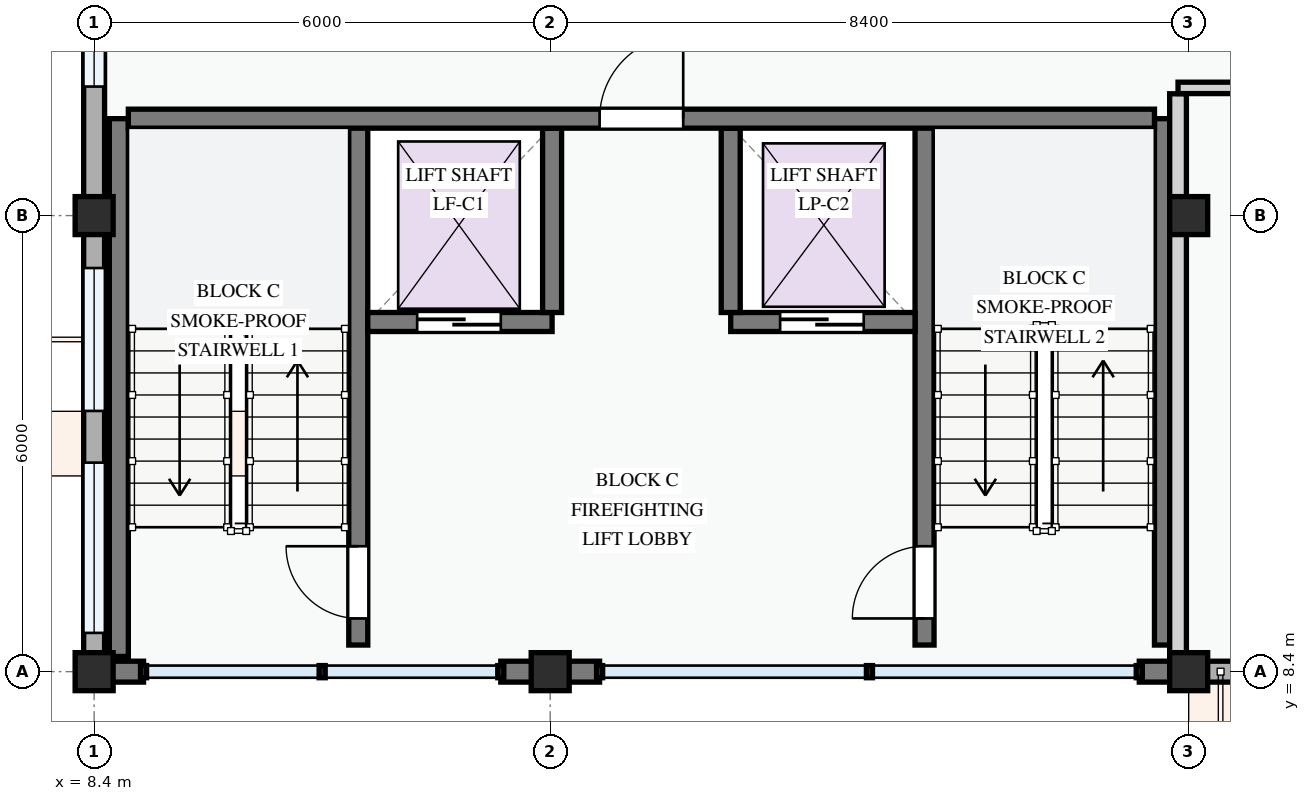
"""IFC4 building model, lengths in metres.
Left out: names, types, materials, properties, quantities, classifications, styles, units other than length and angle.
Written with IfcOpenShell. Run it as: python <this file> out.ifc"""

import sys

from ifc_helpers import new_model, si_unit, direction, frame, frame_2d, origin, origin_2d, place, context, subcontext, project, spatial, rectangle, extrude, element, fill, save


model = new_model("IFC4")
c1 = context("Model", 3, precision=1e-05, world=origin(), true_north=direction((0.0, 1.0)))
c2 = subcontext(c1, "Body", "Model", "MODEL_VIEW")
j1 = project(units=[si_unit("LENGTHUNIT", "METRE"), si_unit("PLANEANGLEUNIT", "RADIAN")], contexts=[c1])
p1 = place(None, origin())
s1 = spatial("IfcSite", under=j1, at=p1, CompositionType="ELEMENT")
p2 = place(p1, origin())
s2 = spatial("IfcBuilding", under=s1, at=p2, CompositionType="ELEMENT")
p3 = place(p2, frame((0.0, 0.0, 24.6)))
s3 = spatial("IfcBuildingStorey", under=s2, at=p3, CompositionType="ELEMENT", Elevation=24.6)
for number, where, z_axis, x_axis in (
    (1, (8.4, 8.4, 0.0), (0.0, 0.0, 1.0), (1.0, 0.0, 0.0)),
    (2, (8.4, 14.4, 0.0), (0.0, 0.0, 1.0), (1.0, 0.0, 0.0)),
    (3, (14.4, 8.4, 0.0), (0.0, 0.0, 1.0), (1.0, 0.0, 0.0)),
    (4, (22.8, 8.4, 0.0), (0.0, 0.0, 1.0), (1.0, 0.0, 0.0)),
    (5, (22.8, 14.4, 0.0), (0.0, 0.0, 1.0), (1.0, 0.0, 0.0)),
):
    element("IfcColumn", number, at=place(p3, frame(where, z_axis=z_axis, x_axis=x_axis)), inside=s3, PredefinedType="COLUMN", context=c2, shape_type="SweptSolid", body=[
        extrude(rectangle(XDim=0.5, YDim=0.5, at=origin_2d()), origin(), (0.0, 0.0, 1.0), 3.3),
    ])
p4 = place(p3, frame((8.4, 22.8, 0.0), z_axis=(0.0, 0.0, 1.0), x_axis=(0.0, -1.0, 0.0)))
e6 = element("IfcWall", 6, at=p4, inside=s3, PredefinedType="STANDARD", context=c2, shape_type="SweptSolid", body=[
    extrude(rectangle(XDim=8.4, YDim=0.275, at=frame_2d((4.2, 0.0))), origin(), (0.0, 0.0, 1.0), 2.425),
])
p5 = place(p4, frame((1.035, 0.0, 0.78)))
e7 = element("IfcOpeningElement", 7, at=p5, cuts=e6, PredefinedType="OPENING", context=c2, shape_type="SweptSolid", body=[
    extrude(rectangle(XDim=2.32, YDim=1.5, at=frame_2d((1.16, 0.75))), frame((0.0, 0.147, 0.0), z_axis=(0.0, -1.0, 0.0), x_axis=(1.0, 0.0, 0.0)), (0.0, 0.0, 1.0), 0.295),
])
p6 = place(p4, frame((4.623, 0.0, 0.78)))
e8 = element("IfcOpeningElement", 8, at=p6, cuts=e6, PredefinedType="OPENING", context=c2, shape_type="SweptSolid", body=[
    extrude(rectangle(XDim=2.08, YDim=1.52, at=frame_2d((1.04, 0.76))), frame((0.0, 0.147, 0.0), z_axis=(0.0, -1.0, 0.0), x_axis=(1.0, 0.0, 0.0)), (0.0, 0.0, 1.0), 0.295),
])
p7 = place(p3, frame((8.4, 14.4, 0.0), z_axis=(0.0, 0.0, 1.0), x_axis=(0.0, -1.0, 0.0)))
e9 = element("IfcWall", 9, at=p7, inside=s3, PredefinedType="STANDARD", context=c2, shape_type="SweptSolid", body=[
    extrude(rectangle(XDim=6.0, YDim=0.275, at=frame_2d((3.0, 0.0))), origin(), (0.0, 0.0, 1.0), 2.575),
])
p8 = place(p7, frame((0.69, 0.0, 0.78)))
e10 = element("IfcOpeningElement", 10, at=p8, cuts=e9, PredefinedType="OPENING", context=c2, shape_type="SweptSolid", body=[
    extrude(rectangle(XDim=1.88, YDim=1.52, at=frame_2d((0.94, 0.76))), frame((0.0, 0.147, 0.0), z_axis=(0.0, -1.0, 0.0), x_axis=(1.0, 0.0, 0.0)), (0.0, 0.0, 1.0), 0.295),
])
p9 = place(p7, frame((3.25, 0.0, 0.78)))
e11 = element("IfcOpeningElement", 11, at=p9, cuts=e9, PredefinedType="OPENING", context=c2, shape_type="SweptSolid", body=[
    extrude(rectangle(XDim=2.24, YDim=1.52, at=frame_2d((1.12, 0.76))), frame((0.0, 0.147, 0.0), z_axis=(0.0, -1.0, 0.0), x_axis=(1.0, 0.0, 0.0)), (0.0, 0.0, 1.0), 0.295),
])
p10 = place(p3, frame((8.54, 8.4, 0.0), z_axis=(0.0, 0.0, 1.0), x_axis=(1.0, 0.0, 0.0)))
e12 = element("IfcWall", 12, at=p10, inside=s3, PredefinedType="STANDARD", context=c2, shape_type="SweptSolid", body=[
    extrude(rectangle(XDim=0.51, YDim=0.275, at=frame_2d((0.255, 0.0))), origin(), (0.0, 0.0, 1.0), 3.04),
])
p11 = place(p3, frame((13.75, 8.4, 0.0), z_axis=(0.0, 0.0, 1.0), x_axis=(1.0, 0.0, 0.0)))
e13 = element("IfcWall", 13, at=p11, inside=s3, PredefinedType="STANDARD", context=c2, shape_type="SweptSolid", body=[
    extrude(rectangle(XDim=0.65, YDim=0.275, at=frame_2d((0.325, 0.0))), origin(), (0.0, 0.0, 1.0), 3.04),
])
for number, where, z_axis, x_axis in (
    (14, (14.4, 8.4, 0.0), (0.0, 0.0, 1.0), (1.0, 0.0, 0.0)),
    (15, (22.15, 8.4, 0.0), (0.0, 0.0, 1.0), (1.0, 0.0, 0.0)),
):
    element("IfcWall", number, at=place(p3, frame(where, z_axis=z_axis, x_axis=x_axis)), inside=s3, PredefinedType="STANDARD", context=c2, shape_type="SweptSolid", body=[
        extrude(rectangle(XDim=0.65, YDim=0.275, at=frame_2d((0.325, 0.0))), origin(), (0.0, 0.0, 1.0), 3.04),
    ])
p12 = place(p3, frame((22.8, 8.4, 0.0), z_axis=(0.0, 0.0, 1.0), x_axis=(1.0, 0.0, 0.0)))
e16 = element("IfcWall", 16, at=p12, inside=s3, PredefinedType="STANDARD", context=c2, shape_type="SweptSolid", body=[
    extrude(rectangle(XDim=6.0, YDim=0.275, at=frame_2d((3.0, 0.0))), origin(), (0.0, 0.0, 1.0), 2.475),
])
p13 = place(p12, frame((0.62, 0.0, 0.0)))
e17 = element("IfcOpeningElement", 17, at=p13, cuts=e16, PredefinedType="OPENING", context=c2, shape_type="SweptSolid", body=[
    extrude(rectangle(XDim=1.1, YDim=2.15, at=frame_2d((0.55, 1.075))), frame((0.0, 0.147, 0.0), z_axis=(0.0, -1.0, 0.0), x_axis=(1.0, 0.0, 0.0)), (0.0, 0.0, 1.0), 0.295),
])
p14 = place(p12, frame((2.482, 0.0, 0.78)))
e18 = element("IfcOpeningElement", 18, at=p14, cuts=e16, PredefinedType="OPENING", context=c2, shape_type="SweptSolid", body=[
    extrude(rectangle(XDim=1.05, YDim=1.2, at=frame_2d((0.525, 0.6))), frame((0.0, 0.147, 0.0), z_axis=(0.0, -1.0, 0.0), x_axis=(1.0, 0.0, 0.0)), (0.0, 0.0, 1.0), 0.295),
])
p15 = place(p12, frame((4.552, 0.0, 0.78)))
e19 = element("IfcOpeningElement", 19, at=p15, cuts=e16, PredefinedType="OPENING", context=c2, shape_type="SweptSolid", body=[
    extrude(rectangle(XDim=0.95, YDim=1.15, at=frame_2d((0.475, 0.575))), frame((0.0, 0.147, 0.0), z_axis=(0.0, -1.0, 0.0), x_axis=(1.0, 0.0, 0.0)), (0.0, 0.0, 1.0), 0.295),
])
p16 = place(p3, frame((11.875, 8.75, 0.0), z_axis=(0.0, 0.0, 1.0), x_axis=(0.0, 1.0, 0.0)))
e20 = element("IfcWall", 20, at=p16, inside=s3, PredefinedType="SHEAR", context=c2, shape_type="SweptSolid", body=[
    extrude(rectangle(XDim=6.925, YDim=0.25, at=frame_2d((3.462, 0.0))), origin(), (0.0, 0.0, 1.0), 3.0),
])
p17 = place(p16, frame((0.35, 0.0, 0.0)))
e21 = element("IfcOpeningElement", 21, at=p17, cuts=e20, PredefinedType="OPENING", context=c2, shape_type="SweptSolid", body=[
    extrude(rectangle(XDim=0.95, YDim=2.1, at=frame_2d((0.475, 1.05))), frame((0.0, 0.135, 0.0), z_axis=(0.0, -1.0, 0.0), x_axis=(1.0, 0.0, 0.0)), (0.0, 0.0, 1.0), 0.27),
])
p18 = place(p3, frame((8.725, 8.6, 0.0), z_axis=(0.0, 0.0, 1.0), x_axis=(0.0, 1.0, 0.0)))
e22 = element("IfcWall", 22, at=p18, inside=s3, PredefinedType="SHEAR", context=c2, shape_type="SweptSolid", body=[
    extrude(rectangle(XDim=7.075, YDim=0.25, at=frame_2d((3.538, 0.0))), origin(), (0.0, 0.0, 1.0), 3.0),
])
p19 = place(p3, frame((22.475, 8.75, 0.0), z_axis=(0.0, 0.0, 1.0), x_axis=(0.0, 1.0, 0.0)))
e23 = element("IfcWall", 23, at=p19, inside=s3, PredefinedType="SHEAR", context=c2, shape_type="SweptSolid", body=[
    extrude(rectangle(XDim=6.925, YDim=0.25, at=frame_2d((3.462, 0.0))), origin(), (0.0, 0.0, 1.0), 3.0),
])
p20 = place(p3, frame((19.325, 8.75, 0.0), z_axis=(0.0, 0.0, 1.0), x_axis=(0.0, 1.0, 0.0)))
e24 = element("IfcWall", 24, at=p20, inside=s3, PredefinedType="SHEAR", context=c2, shape_type="SweptSolid", body=[
    extrude(rectangle(XDim=6.925, YDim=0.25, at=frame_2d((3.462, 0.0))), origin(), (0.0, 0.0, 1.0), 3.0),
])
p21 = place(p20, frame((0.35, 0.0, 0.0)))
e25 = element("IfcOpeningElement", 25, at=p21, cuts=e24, PredefinedType="OPENING", context=c2, shape_type="SweptSolid", body=[
    extrude(rectangle(XDim=0.95, YDim=2.1, at=frame_2d((0.475, 1.05))), frame((0.0, 0.135, 0.0), z_axis=(0.0, -1.0, 0.0), x_axis=(1.0, 0.0, 0.0)), (0.0, 0.0, 1.0), 0.27),
])
p22 = place(p3, frame((12.0, 13.0, 0.0), z_axis=(0.0, 0.0, 1.0), x_axis=(1.0, 0.0, 0.0)))
e26 = element("IfcWall", 26, at=p22, inside=s3, PredefinedType="SHEAR", context=c2, shape_type="SweptSolid", body=[
    extrude(rectangle(XDim=2.425, YDim=0.25, at=frame_2d((1.212, 0.0))), origin(), (0.0, 0.0, 1.0), 3.0),
])
p23 = place(p22, frame((0.65, 0.0, 0.0)))
e27 = element("IfcOpeningElement", 27, at=p23, cuts=e26, PredefinedType="OPENING", context=c2, shape_type="SweptSolid", body=[
    extrude(rectangle(XDim=1.1, YDim=2.15, at=frame_2d((0.55, 1.075))), frame((0.0, 0.135, 0.0), z_axis=(0.0, -1.0, 0.0), x_axis=(1.0, 0.0, 0.0)), (0.0, 0.0, 1.0), 0.27),
])
p24 = place(p3, frame((16.775, 13.0, 0.0), z_axis=(0.0, 0.0, 1.0), x_axis=(1.0, 0.0, 0.0)))
e28 = element("IfcWall", 28, at=p24, inside=s3, PredefinedType="SHEAR", context=c2, shape_type="SweptSolid", body=[
    extrude(rectangle(XDim=2.425, YDim=0.25, at=frame_2d((1.212, 0.0))), origin(), (0.0, 0.0, 1.0), 3.0),
])
p25 = place(p24, frame((0.65, 0.0, 0.0)))
e29 = element("IfcOpeningElement", 29, at=p25, cuts=e28, PredefinedType="OPENING", context=c2, shape_type="SweptSolid", body=[
    extrude(rectangle(XDim=1.1, YDim=2.15, at=frame_2d((0.55, 1.075))), frame((0.0, 0.135, 0.0), z_axis=(0.0, -1.0, 0.0), x_axis=(1.0, 0.0, 0.0)), (0.0, 0.0, 1.0), 0.27),
])
for number, where, z_axis, x_axis in (
    (30, (14.425, 13.125, 0.0), (0.0, 0.0, 1.0), (0.0, 1.0, 0.0)),
    (31, (16.775, 13.125, 0.0), (0.0, 0.0, 1.0), (0.0, 1.0, 0.0)),
):
    element("IfcWall", number, at=place(p3, frame(where, z_axis=z_axis, x_axis=x_axis)), inside=s3, PredefinedType="SHEAR", context=c2, shape_type="SweptSolid", body=[
        extrude(rectangle(XDim=2.425, YDim=0.25, at=frame_2d((1.212, 0.0))), origin(), (0.0, 0.0, 1.0), 3.0),
    ])
p26 = place(p3, frame((8.85, 15.675, 0.0), z_axis=(0.0, 0.0, 1.0), x_axis=(1.0, 0.0, 0.0)))
e32 = element("IfcWall", 32, at=p26, inside=s3, PredefinedType="SHEAR", context=c2, shape_type="SweptSolid", body=[
    extrude(rectangle(XDim=13.5, YDim=0.25, at=frame_2d((6.75, 0.0))), origin(), (0.0, 0.0, 1.0), 3.0),
])
p27 = place(p26, frame((6.2, 0.0, 0.0)))
e33 = element("IfcOpeningElement", 33, at=p27, cuts=e32, PredefinedType="OPENING", context=c2, shape_type="SweptSolid", body=[
    extrude(rectangle(XDim=1.1, YDim=2.15, at=frame_2d((0.55, 1.075))), frame((0.0, 0.135, 0.0), z_axis=(0.0, -1.0, 0.0), x_axis=(1.0, 0.0, 0.0)), (0.0, 0.0, 1.0), 0.27),
])
p28 = place(p3, frame((22.66, 8.54, 0.0), z_axis=(0.0, 0.0, 1.0), x_axis=(0.0, 1.0, 0.0)))
e34 = element("IfcWall", 34, at=p28, inside=s3, PredefinedType="PARTITIONING", context=c2, shape_type="SweptSolid", body=[
    extrude(rectangle(XDim=7.463, YDim=0.22, at=frame_2d((3.732, 0.0))), origin(), (0.0, 0.0, 1.0), 2.425),
])
p29 = place(p3, frame((22.66, 16.08, 0.0), z_axis=(0.0, 0.0, 1.0), x_axis=(1.0, 0.0, 0.0)))
e35 = element("IfcWall", 35, at=p29, inside=s3, PredefinedType="PARTITIONING", context=c2, shape_type="SweptSolid", body=[
    extrude(rectangle(XDim=34.88, YDim=0.15, at=frame_2d((17.44, 0.0))), origin(), (0.0, 0.0, 1.0), 3.0),
])
p30 = place(p29, frame((2.627, 0.0, 0.0)))
e36 = element("IfcOpeningElement", 36, at=p30, cuts=e35, PredefinedType="OPENING", context=c2, shape_type="SweptSolid", body=[
    extrude(rectangle(XDim=0.92, YDim=2.1, at=frame_2d((0.46, 1.05))), frame((0.0, 0.085, 0.0), z_axis=(0.0, -1.0, 0.0), x_axis=(1.0, 0.0, 0.0)), (0.0, 0.0, 1.0), 0.17),
])
p31 = place(p29, frame((10.02, 0.0, 0.0)))
e37 = element("IfcOpeningElement", 37, at=p31, cuts=e35, PredefinedType="OPENING", context=c2, shape_type="SweptSolid", body=[
    extrude(rectangle(XDim=0.96, YDim=2.12, at=frame_2d((0.48, 1.06))), frame((0.0, 0.085, 0.0), z_axis=(0.0, -1.0, 0.0), x_axis=(1.0, 0.0, 0.0)), (0.0, 0.0, 1.0), 0.17),
])
p32 = place(p29, frame((24.355, 0.0, 0.0)))
e38 = element("IfcOpeningElement", 38, at=p32, cuts=e35, PredefinedType="OPENING", context=c2, shape_type="SweptSolid", body=[
    extrude(rectangle(XDim=0.92, YDim=2.1, at=frame_2d((0.46, 1.05))), frame((0.0, 0.085, 0.0), z_axis=(0.0, -1.0, 0.0), x_axis=(1.0, 0.0, 0.0)), (0.0, 0.0, 1.0), 0.17),
])
p33 = place(p6, origin())
e39 = element("IfcWindow", 39, at=p33, inside=s3, PartitioningType="DOUBLE_PANEL_VERTICAL", PredefinedType="WINDOW", context=c2, shape_type="SweptSolid", body=[
    extrude(rectangle(XDim=2.08, YDim=1.52, at=frame_2d((1.04, 0.76))), frame((0.0, 0.03, 0.0), z_axis=(0.0, -1.0, 0.0), x_axis=(1.0, 0.0, 0.0)), (0.0, 0.0, 1.0), 0.06),
])
fill(e8, e39)
p34 = place(p8, origin())
e40 = element("IfcWindow", 40, at=p34, inside=s3, PartitioningType="DOUBLE_PANEL_VERTICAL", PredefinedType="WINDOW", context=c2, shape_type="SweptSolid", body=[
    extrude(rectangle(XDim=1.88, YDim=1.52, at=frame_2d((0.94, 0.76))), frame((0.0, 0.03, 0.0), z_axis=(0.0, -1.0, 0.0), x_axis=(1.0, 0.0, 0.0)), (0.0, 0.0, 1.0), 0.06),
])
fill(e10, e40)
p35 = place(p9, origin())
e41 = element("IfcWindow", 41, at=p35, inside=s3, PartitioningType="DOUBLE_PANEL_VERTICAL", PredefinedType="WINDOW", context=c2, shape_type="SweptSolid", body=[
    extrude(rectangle(XDim=2.24, YDim=1.52, at=frame_2d((1.12, 0.76))), frame((0.0, 0.03, 0.0), z_axis=(0.0, -1.0, 0.0), x_axis=(1.0, 0.0, 0.0)), (0.0, 0.0, 1.0), 0.06),
])
fill(e11, e41)
p36 = place(p17, origin())
e42 = element("IfcDoor", 42, at=p36, inside=s3, OperationType="SINGLE_SWING_RIGHT", PredefinedType="DOOR", context=c2, shape_type="SweptSolid", body=[
    extrude(rectangle(XDim=0.95, YDim=2.1, at=frame_2d((0.475, 1.05))), frame((0.0, 0.025, 0.0), z_axis=(0.0, -1.0, 0.0), x_axis=(1.0, 0.0, 0.0)), (0.0, 0.0, 1.0), 0.05),
])
fill(e21, e42)
p37 = place(p21, origin())
e43 = element("IfcDoor", 43, at=p37, inside=s3, OperationType="SINGLE_SWING_LEFT", PredefinedType="DOOR", context=c2, shape_type="SweptSolid", body=[
    extrude(rectangle(XDim=0.95, YDim=2.1, at=frame_2d((0.475, 1.05))), frame((0.0, 0.025, 0.0), z_axis=(0.0, -1.0, 0.0), x_axis=(1.0, 0.0, 0.0)), (0.0, 0.0, 1.0), 0.05),
])
fill(e25, e43)
p38 = place(p23, origin())
e44 = element("IfcDoor", 44, at=p38, inside=s3, OperationType="SLIDING_TO_LEFT", PredefinedType="DOOR", context=c2, shape_type="SweptSolid", body=[
    extrude(rectangle(XDim=1.1, YDim=2.15, at=frame_2d((0.55, 1.075))), frame((0.0, 0.025, 0.0), z_axis=(0.0, -1.0, 0.0), x_axis=(1.0, 0.0, 0.0)), (0.0, 0.0, 1.0), 0.05),
])
fill(e27, e44)
p39 = place(p25, origin())
e45 = element("IfcDoor", 45, at=p39, inside=s3, OperationType="SLIDING_TO_LEFT", PredefinedType="DOOR", context=c2, shape_type="SweptSolid", body=[
    extrude(rectangle(XDim=1.1, YDim=2.15, at=frame_2d((0.55, 1.075))), frame((0.0, 0.025, 0.0), z_axis=(0.0, -1.0, 0.0), x_axis=(1.0, 0.0, 0.0)), (0.0, 0.0, 1.0), 0.05),
])
fill(e29, e45)
p40 = place(p27, origin())
e46 = element("IfcDoor", 46, at=p40, inside=s3, OperationType="SINGLE_SWING_RIGHT", PredefinedType="DOOR", context=c2, shape_type="SweptSolid", body=[
    extrude(rectangle(XDim=1.1, YDim=2.15, at=frame_2d((0.55, 1.075))), frame((0.0, 0.025, 0.0), z_axis=(0.0, -1.0, 0.0), x_axis=(1.0, 0.0, 0.0)), (0.0, 0.0, 1.0), 0.05),
])
fill(e33, e46)
save(model, sys.argv[1])
